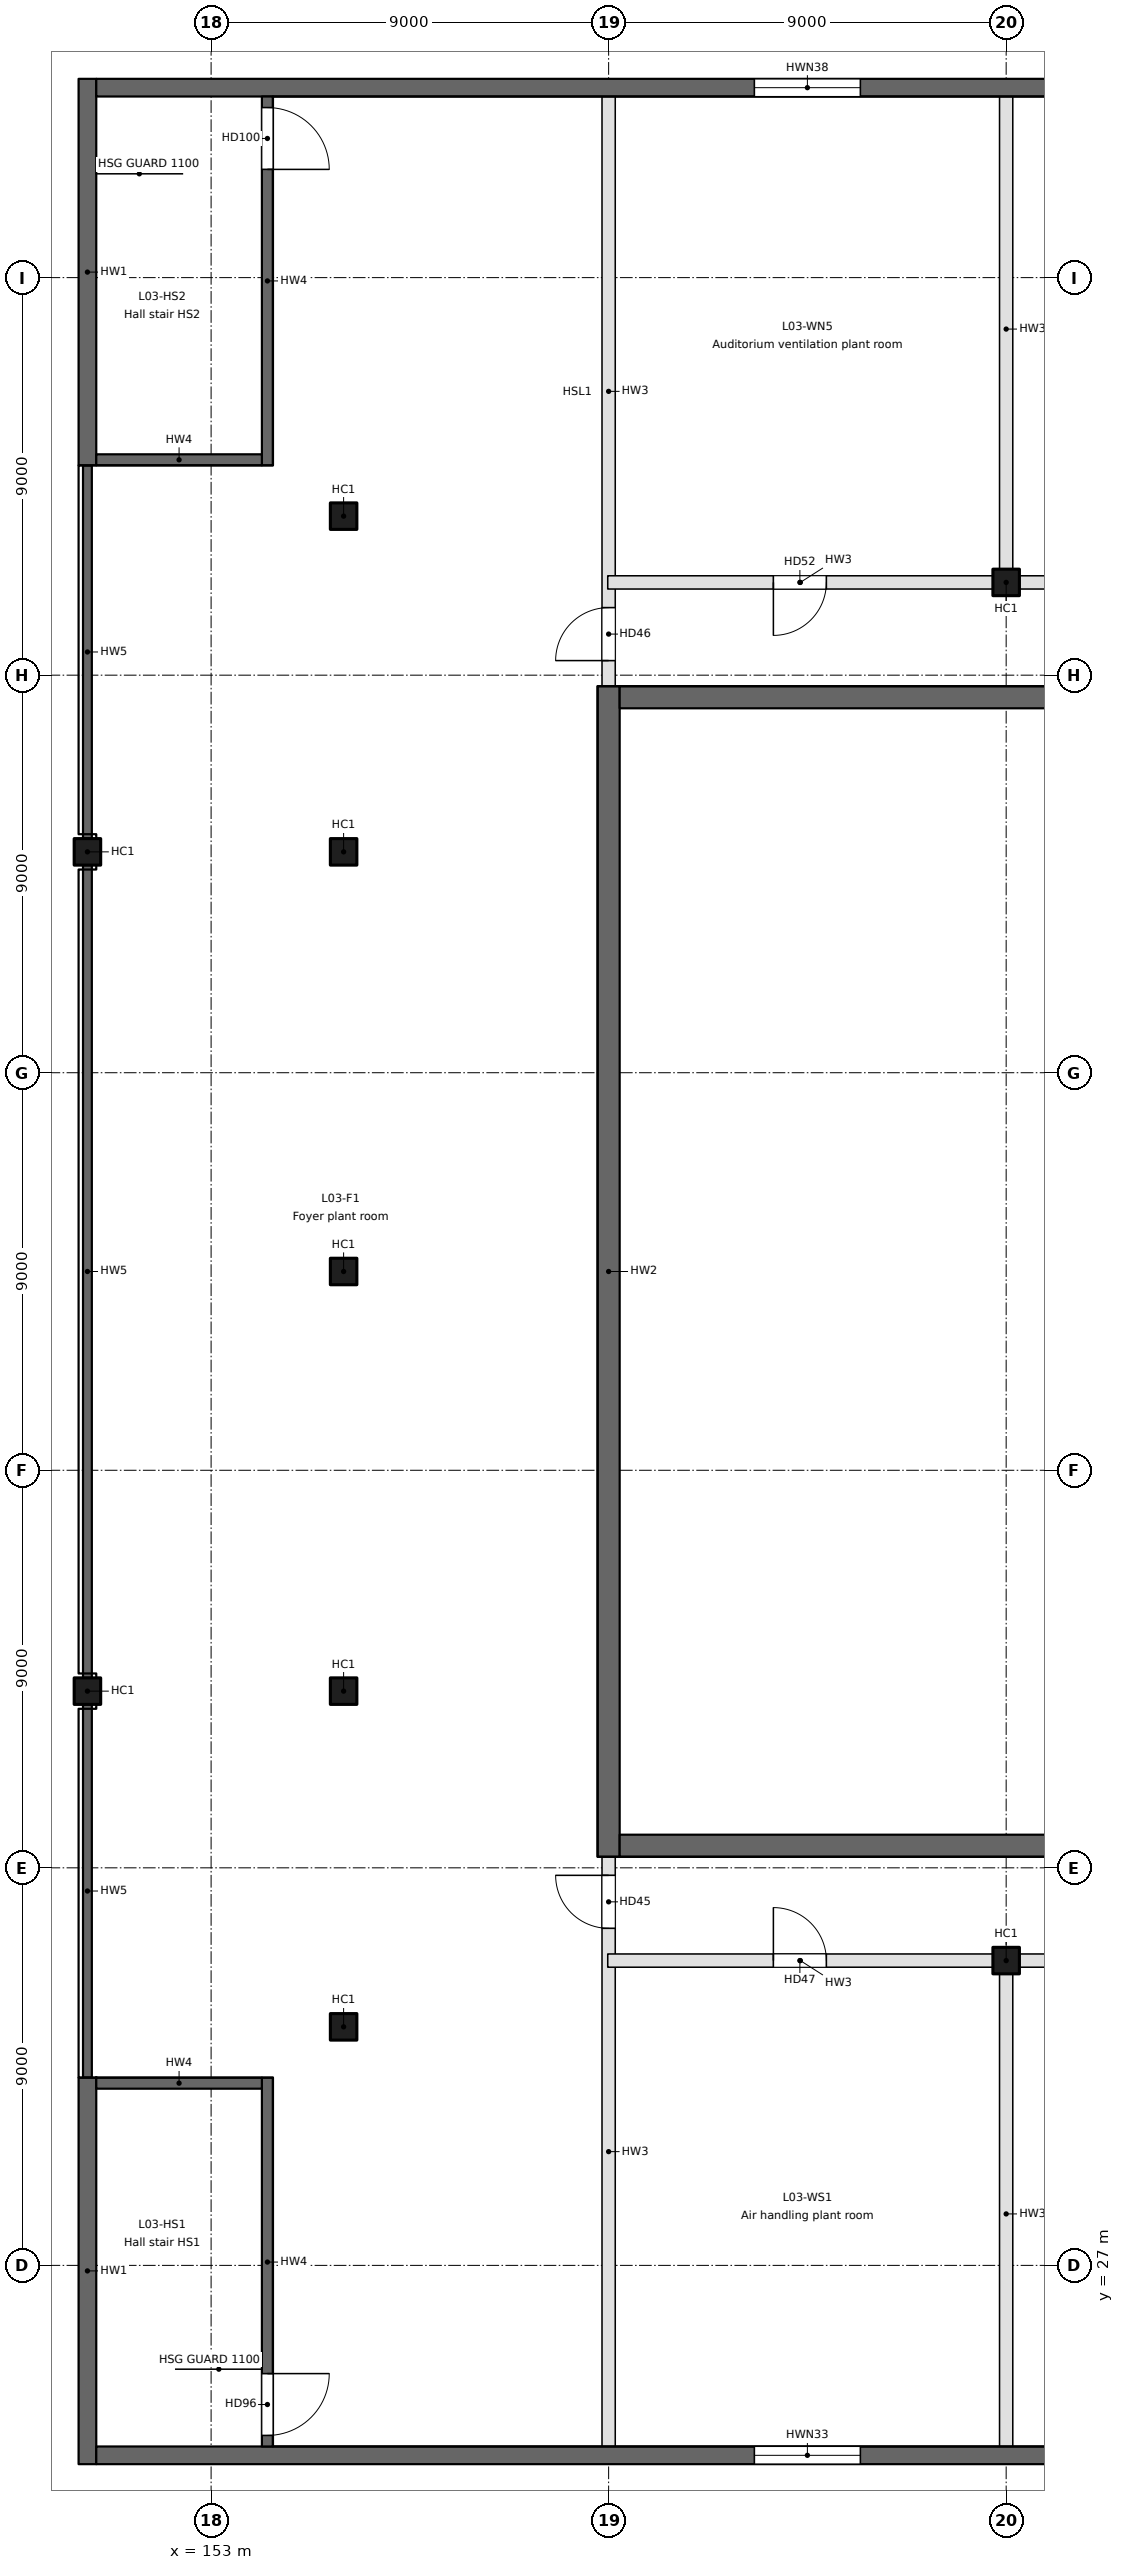
"""IFC4 building model, lengths in metres.
Left out: names, types, materials, properties, quantities, classifications, styles, units other than length and angle.
Written with IfcOpenShell. Run it as: python <this file> out.ifc"""

import sys

from ifc_helpers import new_model, si_unit, direction, frame, frame_2d, origin, origin_2d, place, context, subcontext, project, spatial, rectangle, extrude, element, fill, save


model = new_model("IFC4")
c1 = context("Model", 3, precision=1e-05, world=origin(), true_north=direction((0.0, 1.0)))
c2 = subcontext(c1, "Body", "Model", "MODEL_VIEW")
j1 = project(units=[si_unit("LENGTHUNIT", "METRE"), si_unit("PLANEANGLEUNIT", "RADIAN")], contexts=[c1])
p1 = place(None, origin())
s1 = spatial("IfcSite", under=j1, at=p1, CompositionType="ELEMENT")
p2 = place(p1, origin())
s2 = spatial("IfcBuilding", under=s1, at=p2, CompositionType="ELEMENT")
p3 = place(p2, frame((0.0, 0.0, 16.8)))
s3 = spatial("IfcBuildingStorey", under=s2, at=p3, CompositionType="ELEMENT", Elevation=16.8)
for number, where, z_axis, x_axis in (
    (1, (171.0, 33.9, 0.0), (0.0, 0.0, 1.0), (1.0, 0.0, 0.0)),
    (2, (171.0, 65.1, 0.0), (0.0, 0.0, 1.0), (1.0, 0.0, 0.0)),
    (3, (156.0, 32.4, 0.0), (0.0, 0.0, 1.0), (1.0, 0.0, 0.0)),
    (4, (156.0, 40.0, 0.0), (0.0, 0.0, 1.0), (1.0, 0.0, 0.0)),
    (5, (156.0, 49.5, 0.0), (0.0, 0.0, 1.0), (1.0, 0.0, 0.0)),
    (6, (156.0, 59.0, 0.0), (0.0, 0.0, 1.0), (1.0, 0.0, 0.0)),
    (7, (156.0, 66.6, 0.0), (0.0, 0.0, 1.0), (1.0, 0.0, 0.0)),
    (8, (150.2, 40.0, 0.0), (0.0, 0.0, 1.0), (1.0, 0.0, 0.0)),
    (9, (150.2, 59.0, 0.0), (0.0, 0.0, 1.0), (1.0, 0.0, 0.0)),
):
    element("IfcColumn", number, at=place(p3, frame(where, z_axis=z_axis, x_axis=x_axis)), inside=s3, PredefinedType="COLUMN", context=c2, shape_type="SweptSolid", body=[
        extrude(rectangle(XDim=0.6, YDim=0.6, at=origin_2d()), origin(), (0.0, 0.0, 1.0), 4.8),
    ])
p4 = place(p3, frame((162.0, 36.25, -0.35), z_axis=(0.0, 0.0, 1.0), x_axis=(0.0, 1.0, 0.0)))
e10 = element("IfcWall", 10, at=p4, inside=s3, PredefinedType="SOLIDWALL", context=c2, shape_type="SweptSolid", body=[
    extrude(rectangle(XDim=26.5, YDim=0.5, at=frame_2d((13.25, 0.0))), origin(), (0.0, 0.0, 1.0), 4.8),
])
for number, where, z_axis, x_axis in (
    (11, (209.6, 36.5, -0.35), (0.0, 0.0, 1.0), (-1.0, 0.0, 0.0)),
    (12, (162.25, 62.5, -0.35), (0.0, 0.0, 1.0), (1.0, 0.0, 0.0)),
):
    element("IfcWall", number, at=place(p3, frame(where, z_axis=z_axis, x_axis=x_axis)), inside=s3, PredefinedType="SOLIDWALL", context=c2, shape_type="SweptSolid", body=[
        extrude(rectangle(XDim=47.35, YDim=0.5, at=frame_2d((23.675, 0.0))), origin(), (0.0, 0.0, 1.0), 4.8),
    ])
p5 = place(p3, frame((150.2, 22.5, -0.35), z_axis=(0.0, 0.0, 1.0), x_axis=(0.0, 1.0, 0.0)))
e13 = element("IfcWall", 13, at=p5, inside=s3, PredefinedType="SOLIDWALL", context=c2, shape_type="SweptSolid", body=[
    extrude(rectangle(XDim=8.75, YDim=0.4, at=frame_2d((4.375, 0.0))), origin(), (0.0, 0.0, 1.0), 4.8),
])
p6 = place(p3, frame((150.2, 31.25, 0.0), z_axis=(0.0, 0.0, 1.0), x_axis=(0.0, 1.0, 0.0)))
e14 = element("IfcWall", 14, at=p6, inside=s3, PredefinedType="SOLIDWALL", context=c2, shape_type="SweptSolid", body=[
    extrude(rectangle(XDim=8.45, YDim=0.2, at=frame_2d((4.225, 0.0))), origin(), (0.0, 0.0, 1.0), 4.45),
])
p7 = place(p3, frame((150.2, 40.3, 0.0), z_axis=(0.0, 0.0, 1.0), x_axis=(0.0, 1.0, 0.0)))
e15 = element("IfcWall", 15, at=p7, inside=s3, PredefinedType="SOLIDWALL", context=c2, shape_type="SweptSolid", body=[
    extrude(rectangle(XDim=18.4, YDim=0.2, at=frame_2d((9.2, 0.0))), origin(), (0.0, 0.0, 1.0), 4.45),
])
p8 = place(p3, frame((150.2, 59.3, 0.0), z_axis=(0.0, 0.0, 1.0), x_axis=(0.0, 1.0, 0.0)))
e16 = element("IfcWall", 16, at=p8, inside=s3, PredefinedType="SOLIDWALL", context=c2, shape_type="SweptSolid", body=[
    extrude(rectangle(XDim=8.45, YDim=0.2, at=frame_2d((4.225, 0.0))), origin(), (0.0, 0.0, 1.0), 4.45),
])
p9 = place(p3, frame((150.2, 67.75, -0.35), z_axis=(0.0, 0.0, 1.0), x_axis=(0.0, 1.0, 0.0)))
e17 = element("IfcWall", 17, at=p9, inside=s3, PredefinedType="SOLIDWALL", context=c2, shape_type="SweptSolid", body=[
    extrude(rectangle(XDim=8.75, YDim=0.4, at=frame_2d((4.375, 0.0))), origin(), (0.0, 0.0, 1.0), 4.8),
])
p10 = place(p3, frame((209.6, 22.7, -0.35), z_axis=(0.0, 0.0, 1.0), x_axis=(-1.0, 0.0, 0.0)))
e18 = element("IfcWall", 18, at=p10, inside=s3, PredefinedType="SOLIDWALL", context=c2, shape_type="SweptSolid", body=[
    extrude(rectangle(XDim=59.2, YDim=0.4, at=frame_2d((29.6, 0.0))), origin(), (0.0, 0.0, 1.0), 4.8),
])
p11 = place(p10, frame((41.9, 0.0, 1.55)))
e19 = element("IfcOpeningElement", 19, at=p11, cuts=e18, PredefinedType="OPENING", context=c2, shape_type="SweptSolid", body=[
    extrude(rectangle(XDim=2.4, YDim=1.5, at=frame_2d((1.2, 0.75))), frame((0.0, 0.2, 0.0), z_axis=(0.0, -1.0, 0.0), x_axis=(1.0, 0.0, 0.0)), (0.0, 0.0, 1.0), 0.4),
])
p12 = place(p10, frame((32.9, 0.0, 1.55)))
e20 = element("IfcOpeningElement", 20, at=p12, cuts=e18, PredefinedType="OPENING", context=c2, shape_type="SweptSolid", body=[
    extrude(rectangle(XDim=2.4, YDim=1.5, at=frame_2d((1.2, 0.75))), frame((0.0, 0.2, 0.0), z_axis=(0.0, -1.0, 0.0), x_axis=(1.0, 0.0, 0.0)), (0.0, 0.0, 1.0), 0.4),
])
p13 = place(p10, frame((23.9, 0.0, 1.55)))
e21 = element("IfcOpeningElement", 21, at=p13, cuts=e18, PredefinedType="OPENING", context=c2, shape_type="SweptSolid", body=[
    extrude(rectangle(XDim=2.4, YDim=1.5, at=frame_2d((1.2, 0.75))), frame((0.0, 0.2, 0.0), z_axis=(0.0, -1.0, 0.0), x_axis=(1.0, 0.0, 0.0)), (0.0, 0.0, 1.0), 0.4),
])
p14 = place(p10, frame((14.9, 0.0, 1.55)))
e22 = element("IfcOpeningElement", 22, at=p14, cuts=e18, PredefinedType="OPENING", context=c2, shape_type="SweptSolid", body=[
    extrude(rectangle(XDim=2.4, YDim=1.5, at=frame_2d((1.2, 0.75))), frame((0.0, 0.2, 0.0), z_axis=(0.0, -1.0, 0.0), x_axis=(1.0, 0.0, 0.0)), (0.0, 0.0, 1.0), 0.4),
])
p15 = place(p10, frame((5.4, 0.0, 1.55)))
e23 = element("IfcOpeningElement", 23, at=p15, cuts=e18, PredefinedType="OPENING", context=c2, shape_type="SweptSolid", body=[
    extrude(rectangle(XDim=2.4, YDim=1.5, at=frame_2d((1.2, 0.75))), frame((0.0, 0.2, 0.0), z_axis=(0.0, -1.0, 0.0), x_axis=(1.0, 0.0, 0.0)), (0.0, 0.0, 1.0), 0.4),
])
p16 = place(p3, frame((150.4, 76.3, -0.35), z_axis=(0.0, 0.0, 1.0), x_axis=(1.0, 0.0, 0.0)))
e24 = element("IfcWall", 24, at=p16, inside=s3, PredefinedType="SOLIDWALL", context=c2, shape_type="SweptSolid", body=[
    extrude(rectangle(XDim=59.2, YDim=0.4, at=frame_2d((29.6, 0.0))), origin(), (0.0, 0.0, 1.0), 4.8),
])
p17 = place(p16, frame((14.9, 0.0, 1.55)))
e25 = element("IfcOpeningElement", 25, at=p17, cuts=e24, PredefinedType="OPENING", context=c2, shape_type="SweptSolid", body=[
    extrude(rectangle(XDim=2.4, YDim=1.5, at=frame_2d((1.2, 0.75))), frame((0.0, 0.2, 0.0), z_axis=(0.0, -1.0, 0.0), x_axis=(1.0, 0.0, 0.0)), (0.0, 0.0, 1.0), 0.4),
])
p18 = place(p16, frame((23.9, 0.0, 1.55)))
e26 = element("IfcOpeningElement", 26, at=p18, cuts=e24, PredefinedType="OPENING", context=c2, shape_type="SweptSolid", body=[
    extrude(rectangle(XDim=2.4, YDim=1.5, at=frame_2d((1.2, 0.75))), frame((0.0, 0.2, 0.0), z_axis=(0.0, -1.0, 0.0), x_axis=(1.0, 0.0, 0.0)), (0.0, 0.0, 1.0), 0.4),
])
p19 = place(p16, frame((32.9, 0.0, 1.55)))
e27 = element("IfcOpeningElement", 27, at=p19, cuts=e24, PredefinedType="OPENING", context=c2, shape_type="SweptSolid", body=[
    extrude(rectangle(XDim=2.4, YDim=1.5, at=frame_2d((1.2, 0.75))), frame((0.0, 0.2, 0.0), z_axis=(0.0, -1.0, 0.0), x_axis=(1.0, 0.0, 0.0)), (0.0, 0.0, 1.0), 0.4),
])
p20 = place(p16, frame((41.9, 0.0, 1.55)))
e28 = element("IfcOpeningElement", 28, at=p20, cuts=e24, PredefinedType="OPENING", context=c2, shape_type="SweptSolid", body=[
    extrude(rectangle(XDim=2.4, YDim=1.5, at=frame_2d((1.2, 0.75))), frame((0.0, 0.2, 0.0), z_axis=(0.0, -1.0, 0.0), x_axis=(1.0, 0.0, 0.0)), (0.0, 0.0, 1.0), 0.4),
])
p21 = place(p16, frame((51.4, 0.0, 1.55)))
e29 = element("IfcOpeningElement", 29, at=p21, cuts=e24, PredefinedType="OPENING", context=c2, shape_type="SweptSolid", body=[
    extrude(rectangle(XDim=2.4, YDim=1.5, at=frame_2d((1.2, 0.75))), frame((0.0, 0.2, 0.0), z_axis=(0.0, -1.0, 0.0), x_axis=(1.0, 0.0, 0.0)), (0.0, 0.0, 1.0), 0.4),
])
p22 = place(p3, frame((162.0, 22.73, 0.0), z_axis=(0.0, 0.0, 1.0), x_axis=(0.0, 1.0, 0.0)))
e30 = element("IfcWall", 30, at=p22, inside=s3, PredefinedType="PARTITIONING", context=c2, shape_type="SweptSolid", body=[
    extrude(rectangle(XDim=13.69, YDim=0.3, at=frame_2d((6.845, 0.0))), origin(), (0.0, 0.0, 1.0), 4.45),
])
p23 = place(p22, frame((11.9, 0.0, 0.0)))
e31 = element("IfcOpeningElement", 31, at=p23, cuts=e30, PredefinedType="OPENING", context=c2, shape_type="SweptSolid", body=[
    extrude(rectangle(XDim=1.2, YDim=2.1, at=frame_2d((0.6, 1.05))), frame((0.0, 0.15, 0.0), z_axis=(0.0, -1.0, 0.0), x_axis=(1.0, 0.0, 0.0)), (0.0, 0.0, 1.0), 0.3),
])
p24 = place(p3, frame((162.0, 62.58, 0.0), z_axis=(0.0, 0.0, 1.0), x_axis=(0.0, 1.0, 0.0)))
e32 = element("IfcWall", 32, at=p24, inside=s3, PredefinedType="PARTITIONING", context=c2, shape_type="SweptSolid", body=[
    extrude(rectangle(XDim=13.69, YDim=0.3, at=frame_2d((6.845, 0.0))), origin(), (0.0, 0.0, 1.0), 4.45),
])
p25 = place(p24, frame((0.75, 0.0, 0.0)))
e33 = element("IfcOpeningElement", 33, at=p25, cuts=e32, PredefinedType="OPENING", context=c2, shape_type="SweptSolid", body=[
    extrude(rectangle(XDim=1.2, YDim=2.1, at=frame_2d((0.6, 1.05))), frame((0.0, 0.15, 0.0), z_axis=(0.0, -1.0, 0.0), x_axis=(1.0, 0.0, 0.0)), (0.0, 0.0, 1.0), 0.3),
])
for number, where, z_axis, x_axis in (
    (34, (171.0, 22.73, 0.0), (0.0, 0.0, 1.0), (0.0, 1.0, 0.0)),
    (35, (171.0, 65.4, 0.0), (0.0, 0.0, 1.0), (0.0, 1.0, 0.0)),
):
    element("IfcWall", number, at=place(p3, frame(where, z_axis=z_axis, x_axis=x_axis)), inside=s3, PredefinedType="PARTITIONING", context=c2, shape_type="SweptSolid", body=[
        extrude(rectangle(XDim=10.87, YDim=0.3, at=frame_2d((5.435, 0.0))), origin(), (0.0, 0.0, 1.0), 4.45),
    ])
p26 = place(p3, frame((161.98, 33.9, 0.0), z_axis=(0.0, 0.0, 1.0), x_axis=(1.0, 0.0, 0.0)))
e36 = element("IfcWall", 36, at=p26, inside=s3, PredefinedType="PARTITIONING", context=c2, shape_type="SweptSolid", body=[
    extrude(rectangle(XDim=8.72, YDim=0.3, at=frame_2d((4.36, 0.0))), origin(), (0.0, 0.0, 1.0), 4.45),
])
p27 = place(p26, frame((3.75, 0.0, 0.0)))
e37 = element("IfcOpeningElement", 37, at=p27, cuts=e36, PredefinedType="OPENING", context=c2, shape_type="SweptSolid", body=[
    extrude(rectangle(XDim=1.2, YDim=2.1, at=frame_2d((0.6, 1.05))), frame((0.0, 0.15, 0.0), z_axis=(0.0, -1.0, 0.0), x_axis=(1.0, 0.0, 0.0)), (0.0, 0.0, 1.0), 0.3),
])
p28 = place(p3, frame((171.3, 33.9, 0.0), z_axis=(0.0, 0.0, 1.0), x_axis=(1.0, 0.0, 0.0)))
e38 = element("IfcWall", 38, at=p28, inside=s3, PredefinedType="PARTITIONING", context=c2, shape_type="SweptSolid", body=[
    extrude(rectangle(XDim=8.4, YDim=0.3, at=frame_2d((4.2, 0.0))), origin(), (0.0, 0.0, 1.0), 4.45),
])
p29 = place(p28, frame((3.5, 0.0, 0.0)))
e39 = element("IfcOpeningElement", 39, at=p29, cuts=e38, PredefinedType="OPENING", context=c2, shape_type="SweptSolid", body=[
    extrude(rectangle(XDim=1.2, YDim=2.1, at=frame_2d((0.6, 1.05))), frame((0.0, 0.15, 0.0), z_axis=(0.0, -1.0, 0.0), x_axis=(1.0, 0.0, 0.0)), (0.0, 0.0, 1.0), 0.3),
])
p30 = place(p3, frame((170.7, 65.1, 0.0), z_axis=(0.0, 0.0, 1.0), x_axis=(-1.0, 0.0, 0.0)))
e40 = element("IfcWall", 40, at=p30, inside=s3, PredefinedType="PARTITIONING", context=c2, shape_type="SweptSolid", body=[
    extrude(rectangle(XDim=8.72, YDim=0.3, at=frame_2d((4.36, 0.0))), origin(), (0.0, 0.0, 1.0), 4.45),
])
p31 = place(p30, frame((3.77, 0.0, 0.0)))
e41 = element("IfcOpeningElement", 41, at=p31, cuts=e40, PredefinedType="OPENING", context=c2, shape_type="SweptSolid", body=[
    extrude(rectangle(XDim=1.2, YDim=2.1, at=frame_2d((0.6, 1.05))), frame((0.0, 0.15, 0.0), z_axis=(0.0, -1.0, 0.0), x_axis=(1.0, 0.0, 0.0)), (0.0, 0.0, 1.0), 0.3),
])
p32 = place(p3, frame((179.7, 65.1, 0.0), z_axis=(0.0, 0.0, 1.0), x_axis=(-1.0, 0.0, 0.0)))
e42 = element("IfcWall", 42, at=p32, inside=s3, PredefinedType="PARTITIONING", context=c2, shape_type="SweptSolid", body=[
    extrude(rectangle(XDim=8.4, YDim=0.3, at=frame_2d((4.2, 0.0))), origin(), (0.0, 0.0, 1.0), 4.45),
])
p33 = place(p32, frame((3.7, 0.0, 0.0)))
e43 = element("IfcOpeningElement", 43, at=p33, cuts=e42, PredefinedType="OPENING", context=c2, shape_type="SweptSolid", body=[
    extrude(rectangle(XDim=1.2, YDim=2.1, at=frame_2d((0.6, 1.05))), frame((0.0, 0.15, 0.0), z_axis=(0.0, -1.0, 0.0), x_axis=(1.0, 0.0, 0.0)), (0.0, 0.0, 1.0), 0.3),
])
p34 = place(p3, frame((154.275, 31.25, -0.35), z_axis=(0.0, 0.0, 1.0), x_axis=(0.0, -1.0, 0.0)))
e44 = element("IfcWall", 44, at=p34, inside=s3, PredefinedType="SOLIDWALL", context=c2, shape_type="SweptSolid", body=[
    extrude(rectangle(XDim=8.35, YDim=0.25, at=frame_2d((4.175, 0.0))), origin(), (0.0, 0.0, 1.0), 4.8),
])
p35 = place(p34, frame((6.7, 0.0, 0.35)))
e45 = element("IfcOpeningElement", 45, at=p35, cuts=e44, PredefinedType="OPENING", context=c2, shape_type="SweptSolid", body=[
    extrude(rectangle(XDim=1.4, YDim=2.1, at=frame_2d((0.7, 1.05))), frame((0.0, 0.125, 0.0), z_axis=(0.0, -1.0, 0.0), x_axis=(1.0, 0.0, 0.0)), (0.0, 0.0, 1.0), 0.25),
])
p36 = place(p3, frame((150.4, 31.125, -0.35), z_axis=(0.0, 0.0, 1.0), x_axis=(1.0, 0.0, 0.0)))
e46 = element("IfcWall", 46, at=p36, inside=s3, PredefinedType="SOLIDWALL", context=c2, shape_type="SweptSolid", body=[
    extrude(rectangle(XDim=3.75, YDim=0.25, at=frame_2d((1.875, 0.0))), origin(), (0.0, 0.0, 1.0), 4.8),
])
p37 = place(p3, frame((154.275, 76.1, -0.35), z_axis=(0.0, 0.0, 1.0), x_axis=(0.0, -1.0, 0.0)))
e47 = element("IfcWall", 47, at=p37, inside=s3, PredefinedType="SOLIDWALL", context=c2, shape_type="SweptSolid", body=[
    extrude(rectangle(XDim=8.35, YDim=0.25, at=frame_2d((4.175, 0.0))), origin(), (0.0, 0.0, 1.0), 4.8),
])
p38 = place(p37, frame((0.25, 0.0, 0.35)))
e48 = element("IfcOpeningElement", 48, at=p38, cuts=e47, PredefinedType="OPENING", context=c2, shape_type="SweptSolid", body=[
    extrude(rectangle(XDim=1.4, YDim=2.1, at=frame_2d((0.7, 1.05))), frame((0.0, 0.125, 0.0), z_axis=(0.0, -1.0, 0.0), x_axis=(1.0, 0.0, 0.0)), (0.0, 0.0, 1.0), 0.25),
])
p39 = place(p3, frame((154.15, 67.875, -0.35), z_axis=(0.0, 0.0, 1.0), x_axis=(-1.0, 0.0, 0.0)))
e49 = element("IfcWall", 49, at=p39, inside=s3, PredefinedType="SOLIDWALL", context=c2, shape_type="SweptSolid", body=[
    extrude(rectangle(XDim=3.75, YDim=0.25, at=frame_2d((1.875, 0.0))), origin(), (0.0, 0.0, 1.0), 4.8),
])
p40 = place(p23, origin())
e50 = element("IfcDoor", 50, at=p40, inside=s3, OperationType="SINGLE_SWING_RIGHT", PredefinedType="DOOR", context=c2, shape_type="SweptSolid", body=[
    extrude(rectangle(XDim=1.2, YDim=2.1, at=frame_2d((0.6, 1.05))), frame((0.0, 0.025, 0.0), z_axis=(0.0, -1.0, 0.0), x_axis=(1.0, 0.0, 0.0)), (0.0, 0.0, 1.0), 0.05),
])
fill(e31, e50)
p41 = place(p25, origin())
e51 = element("IfcDoor", 51, at=p41, inside=s3, OperationType="SINGLE_SWING_LEFT", PredefinedType="DOOR", context=c2, shape_type="SweptSolid", body=[
    extrude(rectangle(XDim=1.2, YDim=2.1, at=frame_2d((0.6, 1.05))), frame((0.0, 0.025, 0.0), z_axis=(0.0, -1.0, 0.0), x_axis=(1.0, 0.0, 0.0)), (0.0, 0.0, 1.0), 0.05),
])
fill(e33, e51)
p42 = place(p27, origin())
e52 = element("IfcDoor", 52, at=p42, inside=s3, OperationType="SINGLE_SWING_LEFT", PredefinedType="DOOR", context=c2, shape_type="SweptSolid", body=[
    extrude(rectangle(XDim=1.2, YDim=2.1, at=frame_2d((0.6, 1.05))), frame((0.0, 0.025, 0.0), z_axis=(0.0, -1.0, 0.0), x_axis=(1.0, 0.0, 0.0)), (0.0, 0.0, 1.0), 0.05),
])
fill(e37, e52)
p43 = place(p31, origin())
e53 = element("IfcDoor", 53, at=p43, inside=s3, OperationType="SINGLE_SWING_RIGHT", PredefinedType="DOOR", context=c2, shape_type="SweptSolid", body=[
    extrude(rectangle(XDim=1.2, YDim=2.1, at=frame_2d((0.6, 1.05))), frame((0.0, 0.025, 0.0), z_axis=(0.0, -1.0, 0.0), x_axis=(1.0, 0.0, 0.0)), (0.0, 0.0, 1.0), 0.05),
])
fill(e41, e53)
p44 = place(p11, origin())
e54 = element("IfcWindow", 54, at=p44, inside=s3, PartitioningType="SINGLE_PANEL", PredefinedType="WINDOW", context=c2, shape_type="SweptSolid", body=[
    extrude(rectangle(XDim=2.4, YDim=1.5, at=frame_2d((1.2, 0.75))), frame((0.0, 0.03, 0.0), z_axis=(0.0, -1.0, 0.0), x_axis=(1.0, 0.0, 0.0)), (0.0, 0.0, 1.0), 0.06),
])
fill(e19, e54)
p45 = place(p17, origin())
e55 = element("IfcWindow", 55, at=p45, inside=s3, PartitioningType="SINGLE_PANEL", PredefinedType="WINDOW", context=c2, shape_type="SweptSolid", body=[
    extrude(rectangle(XDim=2.4, YDim=1.5, at=frame_2d((1.2, 0.75))), frame((0.0, 0.03, 0.0), z_axis=(0.0, -1.0, 0.0), x_axis=(1.0, 0.0, 0.0)), (0.0, 0.0, 1.0), 0.06),
])
fill(e25, e55)
p46 = place(p35, origin())
e56 = element("IfcDoor", 56, at=p46, inside=s3, OperationType="SINGLE_SWING_LEFT", PredefinedType="DOOR", context=c2, shape_type="SweptSolid", body=[
    extrude(rectangle(XDim=1.4, YDim=2.1, at=frame_2d((0.7, 1.05))), frame((0.0, 0.025, 0.0), z_axis=(0.0, -1.0, 0.0), x_axis=(1.0, 0.0, 0.0)), (0.0, 0.0, 1.0), 0.05),
])
fill(e45, e56)
p47 = place(p38, origin())
e57 = element("IfcDoor", 57, at=p47, inside=s3, OperationType="SINGLE_SWING_RIGHT", PredefinedType="DOOR", context=c2, shape_type="SweptSolid", body=[
    extrude(rectangle(XDim=1.4, YDim=2.1, at=frame_2d((0.7, 1.05))), frame((0.0, 0.025, 0.0), z_axis=(0.0, -1.0, 0.0), x_axis=(1.0, 0.0, 0.0)), (0.0, 0.0, 1.0), 0.05),
])
fill(e48, e57)
save(model, sys.argv[1])
